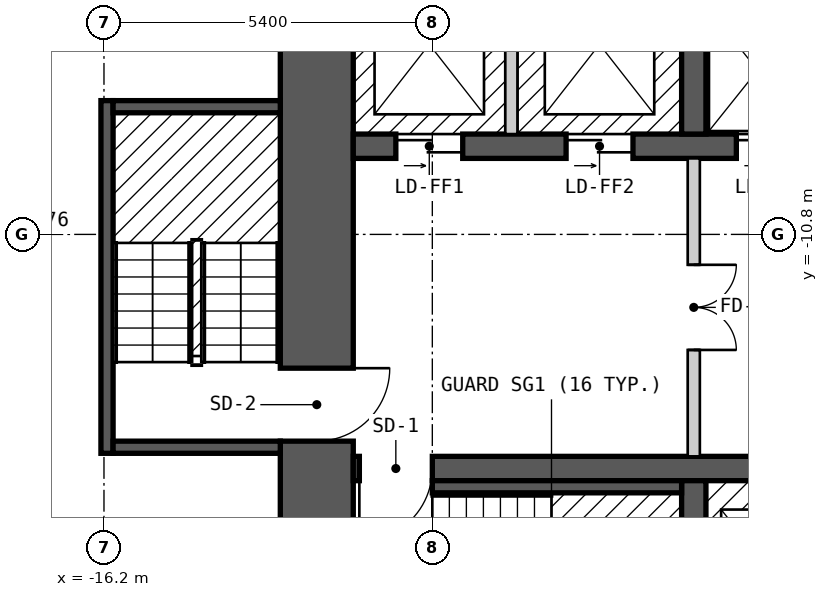
"""IFC4 building model, lengths in metres.
Left out: names, types, materials, properties, quantities, classifications, styles, units other than length and angle.
Written with IfcOpenShell. Run it as: python <this file> out.ifc"""

import sys

from ifc_helpers import new_model, si_unit, direction, frame, frame_2d, origin, place, context, subcontext, project, spatial, rectangle, extrude, element, fill, save


model = new_model("IFC4")
c1 = context("Model", 3, precision=1e-05, world=origin(), true_north=direction((0.0, 1.0)))
c2 = subcontext(c1, "Body", "Model", "MODEL_VIEW")
j1 = project(units=[si_unit("LENGTHUNIT", "METRE"), si_unit("PLANEANGLEUNIT", "RADIAN")], contexts=[c1])
p1 = place(None, origin())
s1 = spatial("IfcSite", under=j1, at=p1, CompositionType="ELEMENT")
p2 = place(p1, origin())
s2 = spatial("IfcBuilding", under=s1, at=p2, CompositionType="ELEMENT")
p3 = place(p2, frame((0.0, 0.0, 29.4)))
s3 = spatial("IfcBuildingStorey", under=s2, at=p3, CompositionType="ELEMENT", Elevation=29.4)
p4 = place(p3, frame((-12.7, -17.8, 0.0), z_axis=(0.0, 0.0, 1.0), x_axis=(0.0, 1.0, 0.0)))
e1 = element("IfcWall", 1, at=p4, inside=s3, PredefinedType="SHEAR", context=c2, shape_type="SweptSolid", body=[
    extrude(rectangle(XDim=11.6, YDim=1.2, at=frame_2d((5.8, 0.0))), origin(), (0.0, 0.0, 1.0), 2.7),
])
p5 = place(p4, frame((3.6, 0.0, 0.0)))
e2 = element("IfcOpeningElement", 2, at=p5, cuts=e1, PredefinedType="OPENING", context=c2, shape_type="SweptSolid", body=[
    extrude(rectangle(XDim=1.2, YDim=2.1, at=frame_2d((0.6, 1.05))), frame((0.0, 0.61, 0.0), z_axis=(0.0, -1.0, 0.0), x_axis=(1.0, 0.0, 0.0)), (0.0, 0.0, 1.0), 1.22),
])
p6 = place(p3, frame((-12.1, -14.65, 0.0), z_axis=(0.0, 0.0, 1.0), x_axis=(1.0, 0.0, 0.0)))
e3 = element("IfcWall", 3, at=p6, inside=s3, PredefinedType="SHEAR", context=c2, shape_type="SweptSolid", body=[
    extrude(rectangle(XDim=24.2, YDim=0.4, at=frame_2d((12.1, 0.0))), origin(), (0.0, 0.0, 1.0), 2.7),
])
p7 = place(p6, frame((1.3, 0.0, 0.0), z_axis=(0.0, 0.0, 1.0), x_axis=(-1.0, 0.0, 0.0)))
e4 = element("IfcOpeningElement", 4, at=p7, cuts=e3, PredefinedType="OPENING", context=c2, shape_type="SweptSolid", body=[
    extrude(rectangle(XDim=1.2, YDim=2.1, at=frame_2d((0.6, 1.05))), frame((0.0, 0.21, 0.0), z_axis=(0.0, -1.0, 0.0), x_axis=(1.0, 0.0, 0.0)), (0.0, 0.0, 1.0), 0.42),
])
p8 = place(p6, frame((24.15, 0.0, 0.0), z_axis=(0.0, 0.0, 1.0), x_axis=(-1.0, 0.0, 0.0)))
e5 = element("IfcOpeningElement", 5, at=p8, cuts=e3, PredefinedType="OPENING", context=c2, shape_type="SweptSolid", body=[
    extrude(rectangle(XDim=1.2, YDim=2.1, at=frame_2d((0.6, 1.05))), frame((0.0, 0.21, 0.0), z_axis=(0.0, -1.0, 0.0), x_axis=(1.0, 0.0, 0.0)), (0.0, 0.0, 1.0), 0.42),
])
p9 = place(p6, frame((16.6, 0.0, 0.0), z_axis=(0.0, 0.0, 1.0), x_axis=(-1.0, 0.0, 0.0)))
e6 = element("IfcOpeningElement", 6, at=p9, cuts=e3, PredefinedType="OPENING", context=c2, shape_type="SweptSolid", body=[
    extrude(rectangle(XDim=1.0, YDim=2.1, at=frame_2d((0.5, 1.05))), frame((0.0, 0.21, 0.0), z_axis=(0.0, -1.0, 0.0), x_axis=(1.0, 0.0, 0.0)), (0.0, 0.0, 1.0), 0.42),
])
p10 = place(p6, frame((18.35, 0.0, 0.0), z_axis=(0.0, 0.0, 1.0), x_axis=(-1.0, 0.0, 0.0)))
e7 = element("IfcOpeningElement", 7, at=p10, cuts=e3, PredefinedType="OPENING", context=c2, shape_type="SweptSolid", body=[
    extrude(rectangle(XDim=0.9, YDim=2.1, at=frame_2d((0.45, 1.05))), frame((0.0, 0.21, 0.0), z_axis=(0.0, -1.0, 0.0), x_axis=(1.0, 0.0, 0.0)), (0.0, 0.0, 1.0), 0.42),
])
p11 = place(p3, frame((-12.1, -9.35, 0.0), z_axis=(0.0, 0.0, 1.0), x_axis=(1.0, 0.0, 0.0)))
e8 = element("IfcWall", 8, at=p11, inside=s3, PredefinedType="SHEAR", context=c2, shape_type="SweptSolid", body=[
    extrude(rectangle(XDim=22.3, YDim=0.4, at=frame_2d((11.15, 0.0))), origin(), (0.0, 0.0, 1.0), 2.7),
])
p12 = place(p11, frame((0.7, 0.0, 0.0)))
e9 = element("IfcOpeningElement", 9, at=p12, cuts=e8, PredefinedType="OPENING", context=c2, shape_type="SweptSolid", body=[
    extrude(rectangle(XDim=1.1, YDim=2.1, at=frame_2d((0.55, 1.05))), frame((0.0, 0.21, 0.0), z_axis=(0.0, -1.0, 0.0), x_axis=(1.0, 0.0, 0.0)), (0.0, 0.0, 1.0), 0.42),
])
p13 = place(p11, frame((3.5, 0.0, 0.0)))
e10 = element("IfcOpeningElement", 10, at=p13, cuts=e8, PredefinedType="OPENING", context=c2, shape_type="SweptSolid", body=[
    extrude(rectangle(XDim=1.1, YDim=2.1, at=frame_2d((0.55, 1.05))), frame((0.0, 0.21, 0.0), z_axis=(0.0, -1.0, 0.0), x_axis=(1.0, 0.0, 0.0)), (0.0, 0.0, 1.0), 0.42),
])
p14 = place(p11, frame((6.3, 0.0, 0.0)))
e11 = element("IfcOpeningElement", 11, at=p14, cuts=e8, PredefinedType="OPENING", context=c2, shape_type="SweptSolid", body=[
    extrude(rectangle(XDim=1.1, YDim=2.1, at=frame_2d((0.55, 1.05))), frame((0.0, 0.21, 0.0), z_axis=(0.0, -1.0, 0.0), x_axis=(1.0, 0.0, 0.0)), (0.0, 0.0, 1.0), 0.42),
])
p15 = place(p11, frame((8.6, 0.0, 0.0)))
e12 = element("IfcOpeningElement", 12, at=p15, cuts=e8, PredefinedType="OPENING", context=c2, shape_type="SweptSolid", body=[
    extrude(rectangle(XDim=1.1, YDim=2.1, at=frame_2d((0.55, 1.05))), frame((0.0, 0.21, 0.0), z_axis=(0.0, -1.0, 0.0), x_axis=(1.0, 0.0, 0.0)), (0.0, 0.0, 1.0), 0.42),
])
p16 = place(p11, frame((10.9, 0.0, 0.0)))
e13 = element("IfcOpeningElement", 13, at=p16, cuts=e8, PredefinedType="OPENING", context=c2, shape_type="SweptSolid", body=[
    extrude(rectangle(XDim=1.1, YDim=2.1, at=frame_2d((0.55, 1.05))), frame((0.0, 0.21, 0.0), z_axis=(0.0, -1.0, 0.0), x_axis=(1.0, 0.0, 0.0)), (0.0, 0.0, 1.0), 0.42),
])
p17 = place(p11, frame((13.2, 0.0, 0.0)))
e14 = element("IfcOpeningElement", 14, at=p17, cuts=e8, PredefinedType="OPENING", context=c2, shape_type="SweptSolid", body=[
    extrude(rectangle(XDim=1.1, YDim=2.1, at=frame_2d((0.55, 1.05))), frame((0.0, 0.21, 0.0), z_axis=(0.0, -1.0, 0.0), x_axis=(1.0, 0.0, 0.0)), (0.0, 0.0, 1.0), 0.42),
])
p18 = place(p11, frame((15.5, 0.0, 0.0)))
e15 = element("IfcOpeningElement", 15, at=p18, cuts=e8, PredefinedType="OPENING", context=c2, shape_type="SweptSolid", body=[
    extrude(rectangle(XDim=1.1, YDim=2.1, at=frame_2d((0.55, 1.05))), frame((0.0, 0.21, 0.0), z_axis=(0.0, -1.0, 0.0), x_axis=(1.0, 0.0, 0.0)), (0.0, 0.0, 1.0), 0.42),
])
p19 = place(p11, frame((17.8, 0.0, 0.0)))
e16 = element("IfcOpeningElement", 16, at=p19, cuts=e8, PredefinedType="OPENING", context=c2, shape_type="SweptSolid", body=[
    extrude(rectangle(XDim=1.1, YDim=2.1, at=frame_2d((0.55, 1.05))), frame((0.0, 0.21, 0.0), z_axis=(0.0, -1.0, 0.0), x_axis=(1.0, 0.0, 0.0)), (0.0, 0.0, 1.0), 0.42),
])
p20 = place(p11, frame((20.2, 0.0, 0.0)))
e17 = element("IfcOpeningElement", 17, at=p20, cuts=e8, PredefinedType="OPENING", context=c2, shape_type="SweptSolid", body=[
    extrude(rectangle(XDim=1.1, YDim=2.1, at=frame_2d((0.55, 1.05))), frame((0.0, 0.21, 0.0), z_axis=(0.0, -1.0, 0.0), x_axis=(1.0, 0.0, 0.0)), (0.0, 0.0, 1.0), 0.42),
])
for number, where, z_axis, x_axis in (
    (18, (-6.5, -17.8, 0.0), (0.0, 0.0, 1.0), (0.0, 1.0, 0.0)),
    (19, (-6.5, -9.15, 0.0), (0.0, 0.0, 1.0), (0.0, 1.0, 0.0)),
):
    element("IfcWall", number, at=place(p3, frame(where, z_axis=z_axis, x_axis=x_axis)), inside=s3, PredefinedType="SHEAR", context=c2, shape_type="SweptSolid", body=[
        extrude(rectangle(XDim=2.95, YDim=0.4, at=frame_2d((1.475, 0.0))), origin(), (0.0, 0.0, 1.0), 2.7),
    ])
p21 = place(p3, frame((-16.15, -14.4, 0.0), z_axis=(0.0, 0.0, 1.0), x_axis=(0.0, 1.0, 0.0)))
e20 = element("IfcWall", 20, at=p21, inside=s3, PredefinedType="SOLIDWALL", context=c2, shape_type="SweptSolid", body=[
    extrude(rectangle(XDim=5.8, YDim=0.2, at=frame_2d((2.9, 0.0))), origin(), (0.0, 0.0, 1.0), 2.7),
])
for number, where, z_axis, x_axis in (
    (21, (-16.05, -14.3, 0.0), (0.0, 0.0, 1.0), (1.0, 0.0, 0.0)),
    (22, (-16.05, -8.7, 0.0), (0.0, 0.0, 1.0), (1.0, 0.0, 0.0)),
):
    element("IfcWall", number, at=place(p3, frame(where, z_axis=z_axis, x_axis=x_axis)), inside=s3, PredefinedType="SOLIDWALL", context=c2, shape_type="SweptSolid", body=[
        extrude(rectangle(XDim=2.75, YDim=0.2, at=frame_2d((1.375, 0.0))), origin(), (0.0, 0.0, 1.0), 2.7),
    ])
p22 = place(p3, frame((-10.8, -14.95, 0.0), z_axis=(0.0, 0.0, 1.0), x_axis=(1.0, 0.0, 0.0)))
e23 = element("IfcWall", 23, at=p22, inside=s3, PredefinedType="SOLIDWALL", context=c2, shape_type="SweptSolid", body=[
    extrude(rectangle(XDim=4.1, YDim=0.2, at=frame_2d((2.05, 0.0))), origin(), (0.0, 0.0, 1.0), 2.7),
])
p23 = place(p3, frame((-9.5, -9.15, 0.0), z_axis=(0.0, 0.0, 1.0), x_axis=(0.0, 1.0, 0.0)))
e24 = element("IfcWall", 24, at=p23, inside=s3, PredefinedType="SOLIDWALL", context=c2, shape_type="SweptSolid", body=[
    extrude(rectangle(XDim=2.95, YDim=0.2, at=frame_2d((1.475, 0.0))), origin(), (0.0, 0.0, 1.0), 2.7),
])
p24 = place(p3, frame((-6.5, -14.45, 0.0), z_axis=(0.0, 0.0, 1.0), x_axis=(0.0, 1.0, 0.0)))
e25 = element("IfcWall", 25, at=p24, inside=s3, PredefinedType="PARTITIONING", context=c2, shape_type="SweptSolid", body=[
    extrude(rectangle(XDim=4.9, YDim=0.2, at=frame_2d((2.45, 0.0))), origin(), (0.0, 0.0, 1.0), 2.7),
])
p25 = place(p24, frame((3.15, 0.0, 0.0), z_axis=(0.0, 0.0, 1.0), x_axis=(-1.0, 0.0, 0.0)))
e26 = element("IfcOpeningElement", 26, at=p25, cuts=e25, PredefinedType="OPENING", context=c2, shape_type="SweptSolid", body=[
    extrude(rectangle(XDim=1.4, YDim=2.1, at=frame_2d((0.7, 1.05))), frame((0.0, 0.11, 0.0), z_axis=(0.0, -1.0, 0.0), x_axis=(1.0, 0.0, 0.0)), (0.0, 0.0, 1.0), 0.22),
])
p26 = place(p12, origin())
e27 = element("IfcDoor", 27, at=p26, inside=s3, OperationType="DOUBLE_DOOR_SLIDING", PredefinedType="DOOR", context=c2, shape_type="SweptSolid", body=[
    extrude(rectangle(XDim=1.1, YDim=2.1, at=frame_2d((0.55, 1.05))), frame((0.0, 0.025, 0.0), z_axis=(0.0, -1.0, 0.0), x_axis=(1.0, 0.0, 0.0)), (0.0, 0.0, 1.0), 0.05),
])
fill(e9, e27)
p27 = place(p13, origin())
e28 = element("IfcDoor", 28, at=p27, inside=s3, OperationType="DOUBLE_DOOR_SLIDING", PredefinedType="DOOR", context=c2, shape_type="SweptSolid", body=[
    extrude(rectangle(XDim=1.1, YDim=2.1, at=frame_2d((0.55, 1.05))), frame((0.0, 0.025, 0.0), z_axis=(0.0, -1.0, 0.0), x_axis=(1.0, 0.0, 0.0)), (0.0, 0.0, 1.0), 0.05),
])
fill(e10, e28)
p28 = place(p14, origin())
e29 = element("IfcDoor", 29, at=p28, inside=s3, OperationType="DOUBLE_DOOR_SLIDING", PredefinedType="DOOR", context=c2, shape_type="SweptSolid", body=[
    extrude(rectangle(XDim=1.1, YDim=2.1, at=frame_2d((0.55, 1.05))), frame((0.0, 0.025, 0.0), z_axis=(0.0, -1.0, 0.0), x_axis=(1.0, 0.0, 0.0)), (0.0, 0.0, 1.0), 0.05),
])
fill(e11, e29)
p29 = place(p7, origin())
e30 = element("IfcDoor", 30, at=p29, inside=s3, OperationType="SINGLE_SWING_RIGHT", PredefinedType="DOOR", context=c2, shape_type="SweptSolid", body=[
    extrude(rectangle(XDim=1.2, YDim=2.1, at=frame_2d((0.6, 1.05))), frame((0.0, 0.025, 0.0), z_axis=(0.0, -1.0, 0.0), x_axis=(1.0, 0.0, 0.0)), (0.0, 0.0, 1.0), 0.05),
])
fill(e4, e30)
p30 = place(p5, origin())
e31 = element("IfcDoor", 31, at=p30, inside=s3, OperationType="SINGLE_SWING_RIGHT", PredefinedType="DOOR", context=c2, shape_type="SweptSolid", body=[
    extrude(rectangle(XDim=1.2, YDim=2.1, at=frame_2d((0.6, 1.05))), frame((0.0, 0.025, 0.0), z_axis=(0.0, -1.0, 0.0), x_axis=(1.0, 0.0, 0.0)), (0.0, 0.0, 1.0), 0.05),
])
fill(e2, e31)
p31 = place(p25, origin())
e32 = element("IfcDoor", 32, at=p31, inside=s3, OperationType="DOUBLE_DOOR_SINGLE_SWING", PredefinedType="DOOR", context=c2, shape_type="SweptSolid", body=[
    extrude(rectangle(XDim=1.4, YDim=2.1, at=frame_2d((0.7, 1.05))), frame((0.0, 0.025, 0.0), z_axis=(0.0, -1.0, 0.0), x_axis=(1.0, 0.0, 0.0)), (0.0, 0.0, 1.0), 0.05),
])
fill(e26, e32)
save(model, sys.argv[1])
